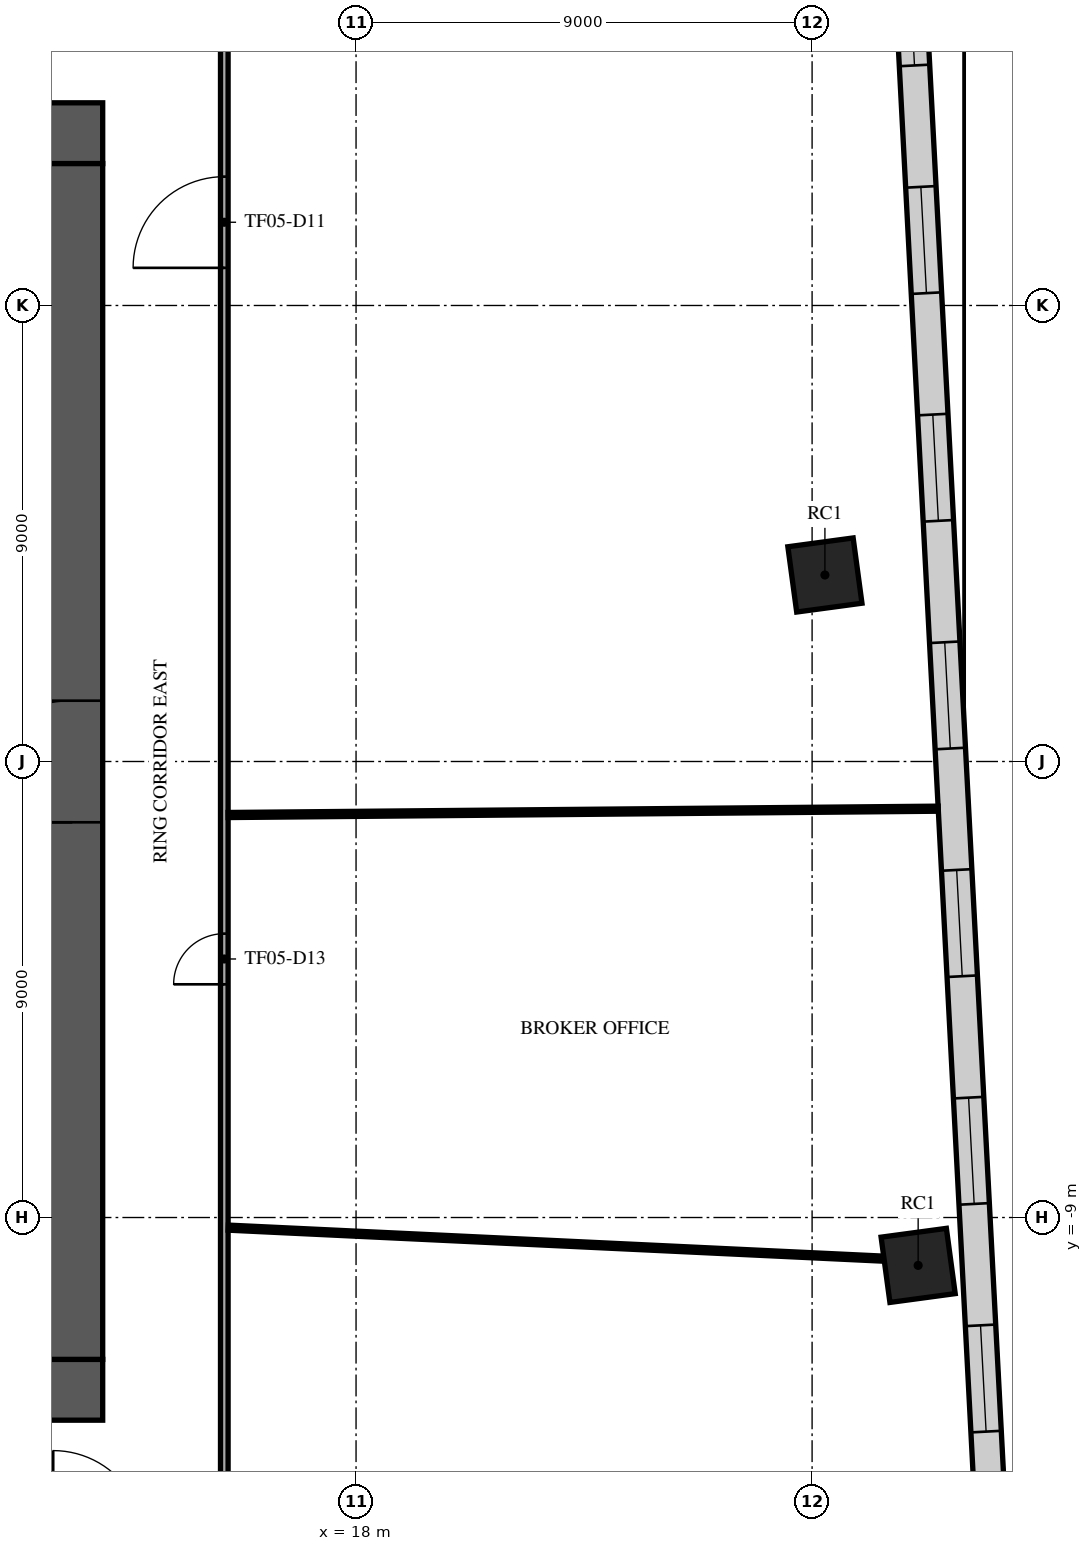
"""IFC4 building model, lengths in metres.
Left out: names, types, materials, properties, quantities, classifications, styles, units other than length and angle.
Written with IfcOpenShell. Run it as: python <this file> out.ifc"""

import sys

from ifc_helpers import new_model, si_unit, direction, frame, frame_2d, origin, origin_2d, place, context, subcontext, project, spatial, rectangle, extrude, element, fill, save


model = new_model("IFC4")
c1 = context("Model", 3, precision=1e-05, world=origin(), true_north=direction((0.0, 1.0)))
c2 = subcontext(c1, "Body", "Model", "MODEL_VIEW")
j1 = project(units=[si_unit("LENGTHUNIT", "METRE"), si_unit("PLANEANGLEUNIT", "RADIAN")], contexts=[c1])
p1 = place(None, origin())
s1 = spatial("IfcSite", under=j1, at=p1, CompositionType="ELEMENT")
p2 = place(p1, origin())
s2 = spatial("IfcBuilding", under=s1, at=p2, CompositionType="ELEMENT")
p3 = place(p2, frame((0.0, 0.0, 22.5)))
s3 = spatial("IfcBuildingStorey", under=s2, at=p3, CompositionType="ELEMENT", Elevation=22.5)
for number, where, z_axis, x_axis in (
    (1, (29.093, -9.945, 0.0), (0.0, 0.0, 1.0), (0.991, 0.134, 0.0)),
    (2, (27.253, 3.681, 0.0), (0.0, 0.0, 1.0), (0.991, 0.134, 0.0)),
):
    element("IfcColumn", number, at=place(p3, frame(where, z_axis=z_axis, x_axis=x_axis)), inside=s3, PredefinedType="COLUMN", context=c2, shape_type="SweptSolid", body=[
        extrude(rectangle(XDim=1.3, YDim=1.3, at=origin_2d()), origin(), (0.0, 0.0, 1.0), 4.8),
    ])
p4 = place(p3, frame((-13.0, 12.4, 0.0), z_axis=(0.0, 0.0, 1.0), x_axis=(1.0, 0.0, 0.0)))
e3 = element("IfcWall", 3, at=p4, inside=s3, PredefinedType="SHEAR", context=c2, shape_type="SweptSolid", body=[
    extrude(rectangle(XDim=26.0, YDim=1.2, at=frame_2d((13.0, 0.0))), origin(), (0.0, 0.0, 1.0), 4.35),
])
p5 = place(p4, frame((11.8, 0.0, 0.0)))
e4 = element("IfcOpeningElement", 4, at=p5, cuts=e3, PredefinedType="OPENING", context=c2, shape_type="SweptSolid", body=[
    extrude(rectangle(XDim=2.4, YDim=2.4, at=frame_2d((1.2, 1.2))), frame((0.0, 0.61, 0.0), z_axis=(0.0, -1.0, 0.0), x_axis=(1.0, 0.0, 0.0)), (0.0, 0.0, 1.0), 1.22),
])
p6 = place(p4, frame((22.625, 0.0, 0.0)))
e5 = element("IfcOpeningElement", 5, at=p6, cuts=e3, PredefinedType="OPENING", context=c2, shape_type="SweptSolid", body=[
    extrude(rectangle(XDim=1.2, YDim=2.1, at=frame_2d((0.6, 1.05))), frame((0.0, 0.61, 0.0), z_axis=(0.0, -1.0, 0.0), x_axis=(1.0, 0.0, 0.0)), (0.0, 0.0, 1.0), 1.22),
])
p7 = place(p4, frame((1.6, 0.0, 0.0)))
e6 = element("IfcOpeningElement", 6, at=p7, cuts=e3, PredefinedType="OPENING", context=c2, shape_type="SweptSolid", body=[
    extrude(rectangle(XDim=1.0, YDim=2.1, at=frame_2d((0.5, 1.05))), frame((0.0, 0.61, 0.0), z_axis=(0.0, -1.0, 0.0), x_axis=(1.0, 0.0, 0.0)), (0.0, 0.0, 1.0), 1.22),
])
p8 = place(p3, frame((-13.0, -12.4, 0.0), z_axis=(0.0, 0.0, 1.0), x_axis=(1.0, 0.0, 0.0)))
e7 = element("IfcWall", 7, at=p8, inside=s3, PredefinedType="SHEAR", context=c2, shape_type="SweptSolid", body=[
    extrude(rectangle(XDim=26.0, YDim=1.2, at=frame_2d((13.0, 0.0))), origin(), (0.0, 0.0, 1.0), 4.35),
])
p9 = place(p8, frame((7.9, 0.0, 0.0)))
e8 = element("IfcOpeningElement", 8, at=p9, cuts=e7, PredefinedType="OPENING", context=c2, shape_type="SweptSolid", body=[
    extrude(rectangle(XDim=2.0, YDim=2.1, at=frame_2d((1.0, 1.05))), frame((0.0, 0.61, 0.0), z_axis=(0.0, -1.0, 0.0), x_axis=(1.0, 0.0, 0.0)), (0.0, 0.0, 1.0), 1.22),
])
p10 = place(p8, frame((18.025, 0.0, 0.0)))
e9 = element("IfcOpeningElement", 9, at=p10, cuts=e7, PredefinedType="OPENING", context=c2, shape_type="SweptSolid", body=[
    extrude(rectangle(XDim=1.2, YDim=2.1, at=frame_2d((0.6, 1.05))), frame((0.0, 0.61, 0.0), z_axis=(0.0, -1.0, 0.0), x_axis=(1.0, 0.0, 0.0)), (0.0, 0.0, 1.0), 1.22),
])
p11 = place(p8, frame((2.175, 0.0, 0.0)))
e10 = element("IfcOpeningElement", 10, at=p11, cuts=e7, PredefinedType="OPENING", context=c2, shape_type="SweptSolid", body=[
    extrude(rectangle(XDim=1.2, YDim=2.1, at=frame_2d((0.6, 1.05))), frame((0.0, 0.61, 0.0), z_axis=(0.0, -1.0, 0.0), x_axis=(1.0, 0.0, 0.0)), (0.0, 0.0, 1.0), 1.22),
])
p12 = place(p8, frame((22.625, 0.0, 0.0)))
e11 = element("IfcOpeningElement", 11, at=p12, cuts=e7, PredefinedType="OPENING", context=c2, shape_type="SweptSolid", body=[
    extrude(rectangle(XDim=1.2, YDim=2.1, at=frame_2d((0.6, 1.05))), frame((0.0, 0.61, 0.0), z_axis=(0.0, -1.0, 0.0), x_axis=(1.0, 0.0, 0.0)), (0.0, 0.0, 1.0), 1.22),
])
p13 = place(p3, frame((12.4, -11.8, 0.0), z_axis=(0.0, 0.0, 1.0), x_axis=(0.0, 1.0, 0.0)))
e12 = element("IfcWall", 12, at=p13, inside=s3, PredefinedType="SHEAR", context=c2, shape_type="SweptSolid", body=[
    extrude(rectangle(XDim=23.6, YDim=1.2, at=frame_2d((11.8, 0.0))), origin(), (0.0, 0.0, 1.0), 4.35),
])
p14 = place(p13, frame((10.6, 0.0, 0.0)))
e13 = element("IfcOpeningElement", 13, at=p14, cuts=e12, PredefinedType="OPENING", context=c2, shape_type="SweptSolid", body=[
    extrude(rectangle(XDim=2.4, YDim=2.4, at=frame_2d((1.2, 1.2))), frame((0.0, 0.61, 0.0), z_axis=(0.0, -1.0, 0.0), x_axis=(1.0, 0.0, 0.0)), (0.0, 0.0, 1.0), 1.22),
])
p15 = place(p3, frame((30.961, -23.287, 0.0), z_axis=(0.0, 0.0, 1.0), x_axis=(-0.052333049168, 0.998629687104, 0.0)))
e14 = element("IfcWall", 14, at=p15, inside=s3, PredefinedType="STANDARD", context=c2, shape_type="SweptSolid", body=[
    extrude(rectangle(XDim=49.376, YDim=0.6, at=frame_2d((24.688, 0.0))), origin(), (0.0, 0.0, 1.0), 4.35),
])
p16 = place(p15, frame((1.138, 0.0, 0.9)))
e15 = element("IfcOpeningElement", 15, at=p16, cuts=e14, PredefinedType="OPENING", context=c2, shape_type="SweptSolid", body=[
    extrude(rectangle(XDim=2.1, YDim=2.7, at=frame_2d((1.05, 1.35))), frame((0.0, 0.31, 0.0), z_axis=(0.0, -1.0, 0.0), x_axis=(1.0, 0.0, 0.0)), (0.0, 0.0, 1.0), 0.62),
])
p17 = place(p15, frame((5.576, 0.0, 0.9)))
e16 = element("IfcOpeningElement", 16, at=p17, cuts=e14, PredefinedType="OPENING", context=c2, shape_type="SweptSolid", body=[
    extrude(rectangle(XDim=2.1, YDim=2.7, at=frame_2d((1.05, 1.35))), frame((0.0, 0.31, 0.0), z_axis=(0.0, -1.0, 0.0), x_axis=(1.0, 0.0, 0.0)), (0.0, 0.0, 1.0), 0.62),
])
p18 = place(p15, frame((10.076, 0.0, 0.9)))
e17 = element("IfcOpeningElement", 17, at=p18, cuts=e14, PredefinedType="OPENING", context=c2, shape_type="SweptSolid", body=[
    extrude(rectangle(XDim=2.1, YDim=2.7, at=frame_2d((1.05, 1.35))), frame((0.0, 0.31, 0.0), z_axis=(0.0, -1.0, 0.0), x_axis=(1.0, 0.0, 0.0)), (0.0, 0.0, 1.0), 0.62),
])
p19 = place(p15, frame((14.576, 0.0, 0.9)))
e18 = element("IfcOpeningElement", 18, at=p19, cuts=e14, PredefinedType="OPENING", context=c2, shape_type="SweptSolid", body=[
    extrude(rectangle(XDim=2.1, YDim=2.7, at=frame_2d((1.05, 1.35))), frame((0.0, 0.31, 0.0), z_axis=(0.0, -1.0, 0.0), x_axis=(1.0, 0.0, 0.0)), (0.0, 0.0, 1.0), 0.62),
])
p20 = place(p15, frame((19.076, 0.0, 0.9)))
e19 = element("IfcOpeningElement", 19, at=p20, cuts=e14, PredefinedType="OPENING", context=c2, shape_type="SweptSolid", body=[
    extrude(rectangle(XDim=2.1, YDim=2.7, at=frame_2d((1.05, 1.35))), frame((0.0, 0.31, 0.0), z_axis=(0.0, -1.0, 0.0), x_axis=(1.0, 0.0, 0.0)), (0.0, 0.0, 1.0), 0.62),
])
p21 = place(p15, frame((23.576, 0.0, 0.9)))
e20 = element("IfcOpeningElement", 20, at=p21, cuts=e14, PredefinedType="OPENING", context=c2, shape_type="SweptSolid", body=[
    extrude(rectangle(XDim=2.1, YDim=2.7, at=frame_2d((1.05, 1.35))), frame((0.0, 0.31, 0.0), z_axis=(0.0, -1.0, 0.0), x_axis=(1.0, 0.0, 0.0)), (0.0, 0.0, 1.0), 0.62),
])
p22 = place(p15, frame((28.076, 0.0, 0.9)))
e21 = element("IfcOpeningElement", 21, at=p22, cuts=e14, PredefinedType="OPENING", context=c2, shape_type="SweptSolid", body=[
    extrude(rectangle(XDim=2.1, YDim=2.7, at=frame_2d((1.05, 1.35))), frame((0.0, 0.31, 0.0), z_axis=(0.0, -1.0, 0.0), x_axis=(1.0, 0.0, 0.0)), (0.0, 0.0, 1.0), 0.62),
])
p23 = place(p15, frame((32.576, 0.0, 0.9)))
e22 = element("IfcOpeningElement", 22, at=p23, cuts=e14, PredefinedType="OPENING", context=c2, shape_type="SweptSolid", body=[
    extrude(rectangle(XDim=2.1, YDim=2.7, at=frame_2d((1.05, 1.35))), frame((0.0, 0.31, 0.0), z_axis=(0.0, -1.0, 0.0), x_axis=(1.0, 0.0, 0.0)), (0.0, 0.0, 1.0), 0.62),
])
p24 = place(p15, frame((37.076, 0.0, 0.9)))
e23 = element("IfcOpeningElement", 23, at=p24, cuts=e14, PredefinedType="OPENING", context=c2, shape_type="SweptSolid", body=[
    extrude(rectangle(XDim=2.1, YDim=2.7, at=frame_2d((1.05, 1.35))), frame((0.0, 0.31, 0.0), z_axis=(0.0, -1.0, 0.0), x_axis=(1.0, 0.0, 0.0)), (0.0, 0.0, 1.0), 0.62),
])
p25 = place(p15, frame((41.576, 0.0, 0.9)))
e24 = element("IfcOpeningElement", 24, at=p25, cuts=e14, PredefinedType="OPENING", context=c2, shape_type="SweptSolid", body=[
    extrude(rectangle(XDim=2.1, YDim=2.7, at=frame_2d((1.05, 1.35))), frame((0.0, 0.31, 0.0), z_axis=(0.0, -1.0, 0.0), x_axis=(1.0, 0.0, 0.0)), (0.0, 0.0, 1.0), 0.62),
])
p26 = place(p15, frame((46.076, 0.0, 0.9)))
e25 = element("IfcOpeningElement", 25, at=p26, cuts=e14, PredefinedType="OPENING", context=c2, shape_type="SweptSolid", body=[
    extrude(rectangle(XDim=2.1, YDim=2.7, at=frame_2d((1.05, 1.35))), frame((0.0, 0.31, 0.0), z_axis=(0.0, -1.0, 0.0), x_axis=(1.0, 0.0, 0.0)), (0.0, 0.0, 1.0), 0.62),
])
p27 = place(p3, frame((15.4, -15.325, 0.0), z_axis=(0.0, 0.0, 1.0), x_axis=(0.0, 1.0, 0.0)))
e26 = element("IfcWall", 26, at=p27, inside=s3, PredefinedType="PARTITIONING", context=c2, shape_type="SweptSolid", body=[
    extrude(rectangle(XDim=30.65, YDim=0.15, at=frame_2d((15.325, 0.0))), origin(), (0.0, 0.0, 1.0), 3.85),
])
p28 = place(p27, frame((25.068, 0.0, 0.0)))
e27 = element("IfcOpeningElement", 27, at=p28, cuts=e26, PredefinedType="OPENING", context=c2, shape_type="SweptSolid", body=[
    extrude(rectangle(XDim=1.8, YDim=2.1, at=frame_2d((0.9, 1.05))), frame((0.0, 0.085, 0.0), z_axis=(0.0, -1.0, 0.0), x_axis=(1.0, 0.0, 0.0)), (0.0, 0.0, 1.0), 0.17),
])
p29 = place(p27, frame((10.927, 0.0, 0.0)))
e28 = element("IfcOpeningElement", 28, at=p29, cuts=e26, PredefinedType="OPENING", context=c2, shape_type="SweptSolid", body=[
    extrude(rectangle(XDim=1.0, YDim=2.1, at=frame_2d((0.5, 1.05))), frame((0.0, 0.085, 0.0), z_axis=(0.0, -1.0, 0.0), x_axis=(1.0, 0.0, 0.0)), (0.0, 0.0, 1.0), 0.17),
])
p30 = place(p3, frame((15.477, -9.2, 0.0), z_axis=(0.0, 0.0, 1.0), x_axis=(0.998880891155, -0.04729656738, 0.0)))
e29 = element("IfcWall", 29, at=p30, inside=s3, PredefinedType="PARTITIONING", context=c2, shape_type="SweptSolid", body=[
    extrude(rectangle(XDim=12.956, YDim=0.1, at=frame_2d((6.478, 0.0))), origin(), (0.0, 0.0, 1.0), 3.85),
])
p31 = place(p3, frame((15.475, -1.056, 0.0), z_axis=(0.0, 0.0, 1.0), x_axis=(0.999960210713, 0.00892059359, 0.0)))
e30 = element("IfcWall", 30, at=p31, inside=s3, PredefinedType="PARTITIONING", context=c2, shape_type="SweptSolid", body=[
    extrude(rectangle(XDim=14.012, YDim=0.1, at=frame_2d((7.006, 0.0))), origin(), (0.0, 0.0, 1.0), 3.55),
])
p32 = place(p14, origin())
e31 = element("IfcDoor", 31, at=p32, inside=s3, OperationType="SINGLE_SWING_LEFT", PredefinedType="DOOR", context=c2, shape_type="SweptSolid", body=[
    extrude(rectangle(XDim=2.4, YDim=2.4, at=frame_2d((1.2, 1.2))), frame((0.0, 0.025, 0.0), z_axis=(0.0, -1.0, 0.0), x_axis=(1.0, 0.0, 0.0)), (0.0, 0.0, 1.0), 0.05),
])
fill(e13, e31)
p33 = place(p18, origin())
e32 = element("IfcWindow", 32, at=p33, inside=s3, PartitioningType="SINGLE_PANEL", PredefinedType="WINDOW", context=c2, shape_type="SweptSolid", body=[
    extrude(rectangle(XDim=2.1, YDim=2.7, at=frame_2d((1.05, 1.35))), frame((0.0, 0.03, 0.0), z_axis=(0.0, -1.0, 0.0), x_axis=(1.0, 0.0, 0.0)), (0.0, 0.0, 1.0), 0.06),
])
fill(e17, e32)
p34 = place(p19, origin())
e33 = element("IfcWindow", 33, at=p34, inside=s3, PartitioningType="SINGLE_PANEL", PredefinedType="WINDOW", context=c2, shape_type="SweptSolid", body=[
    extrude(rectangle(XDim=2.1, YDim=2.7, at=frame_2d((1.05, 1.35))), frame((0.0, 0.03, 0.0), z_axis=(0.0, -1.0, 0.0), x_axis=(1.0, 0.0, 0.0)), (0.0, 0.0, 1.0), 0.06),
])
fill(e18, e33)
p35 = place(p20, origin())
e34 = element("IfcWindow", 34, at=p35, inside=s3, PartitioningType="SINGLE_PANEL", PredefinedType="WINDOW", context=c2, shape_type="SweptSolid", body=[
    extrude(rectangle(XDim=2.1, YDim=2.7, at=frame_2d((1.05, 1.35))), frame((0.0, 0.03, 0.0), z_axis=(0.0, -1.0, 0.0), x_axis=(1.0, 0.0, 0.0)), (0.0, 0.0, 1.0), 0.06),
])
fill(e19, e34)
p36 = place(p21, origin())
e35 = element("IfcWindow", 35, at=p36, inside=s3, PartitioningType="SINGLE_PANEL", PredefinedType="WINDOW", context=c2, shape_type="SweptSolid", body=[
    extrude(rectangle(XDim=2.1, YDim=2.7, at=frame_2d((1.05, 1.35))), frame((0.0, 0.03, 0.0), z_axis=(0.0, -1.0, 0.0), x_axis=(1.0, 0.0, 0.0)), (0.0, 0.0, 1.0), 0.06),
])
fill(e20, e35)
p37 = place(p22, origin())
e36 = element("IfcWindow", 36, at=p37, inside=s3, PartitioningType="SINGLE_PANEL", PredefinedType="WINDOW", context=c2, shape_type="SweptSolid", body=[
    extrude(rectangle(XDim=2.1, YDim=2.7, at=frame_2d((1.05, 1.35))), frame((0.0, 0.03, 0.0), z_axis=(0.0, -1.0, 0.0), x_axis=(1.0, 0.0, 0.0)), (0.0, 0.0, 1.0), 0.06),
])
fill(e21, e36)
p38 = place(p23, origin())
e37 = element("IfcWindow", 37, at=p38, inside=s3, PartitioningType="SINGLE_PANEL", PredefinedType="WINDOW", context=c2, shape_type="SweptSolid", body=[
    extrude(rectangle(XDim=2.1, YDim=2.7, at=frame_2d((1.05, 1.35))), frame((0.0, 0.03, 0.0), z_axis=(0.0, -1.0, 0.0), x_axis=(1.0, 0.0, 0.0)), (0.0, 0.0, 1.0), 0.06),
])
fill(e22, e37)
p39 = place(p24, origin())
e38 = element("IfcWindow", 38, at=p39, inside=s3, PartitioningType="SINGLE_PANEL", PredefinedType="WINDOW", context=c2, shape_type="SweptSolid", body=[
    extrude(rectangle(XDim=2.1, YDim=2.7, at=frame_2d((1.05, 1.35))), frame((0.0, 0.03, 0.0), z_axis=(0.0, -1.0, 0.0), x_axis=(1.0, 0.0, 0.0)), (0.0, 0.0, 1.0), 0.06),
])
fill(e23, e38)
p40 = place(p28, frame((1.8, 0.0, 0.0), z_axis=(0.0, 0.0, 1.0), x_axis=(-1.0, 0.0, 0.0)))
e39 = element("IfcDoor", 39, at=p40, inside=s3, OperationType="DOUBLE_DOOR_SINGLE_SWING", PredefinedType="DOOR", context=c2, shape_type="SweptSolid", body=[
    extrude(rectangle(XDim=1.8, YDim=2.1, at=frame_2d((0.9, 1.05))), frame((0.0, 0.025, 0.0), z_axis=(0.0, -1.0, 0.0), x_axis=(1.0, 0.0, 0.0)), (0.0, 0.0, 1.0), 0.05),
])
fill(e27, e39)
p41 = place(p29, frame((1.0, 0.0, 0.0), z_axis=(0.0, 0.0, 1.0), x_axis=(-1.0, 0.0, 0.0)))
e40 = element("IfcDoor", 40, at=p41, inside=s3, OperationType="SINGLE_SWING_RIGHT", PredefinedType="DOOR", context=c2, shape_type="SweptSolid", body=[
    extrude(rectangle(XDim=1.0, YDim=2.1, at=frame_2d((0.5, 1.05))), frame((0.0, 0.025, 0.0), z_axis=(0.0, -1.0, 0.0), x_axis=(1.0, 0.0, 0.0)), (0.0, 0.0, 1.0), 0.05),
])
fill(e28, e40)
save(model, sys.argv[1])
